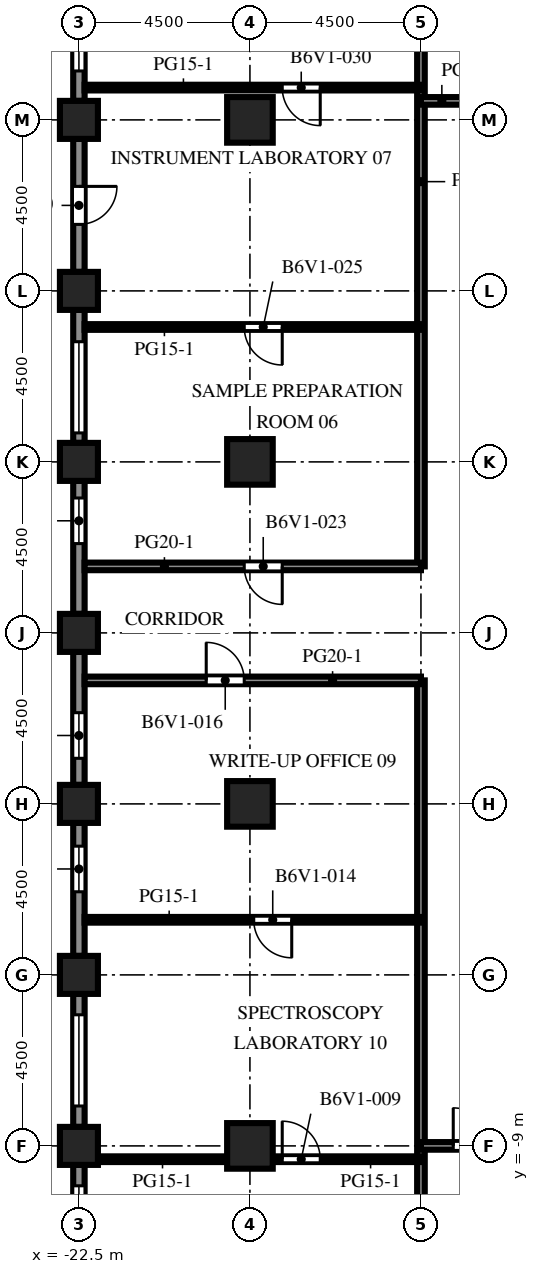
"""IFC4 building model, lengths in metres.
Left out: names, types, materials, properties, quantities, classifications, styles, units other than length and angle.
Written with IfcOpenShell. Run it as: python <this file> out.ifc"""

import sys

from ifc_helpers import new_model, si_unit, direction, frame, frame_2d, origin, origin_2d, place, context, subcontext, project, spatial, rectangle, extrude, element, fill, save


model = new_model("IFC4")
c1 = context("Model", 3, precision=1e-05, world=origin(), true_north=direction((0.0, 1.0)))
c2 = subcontext(c1, "Body", "Model", "MODEL_VIEW")
j1 = project(units=[si_unit("LENGTHUNIT", "METRE"), si_unit("PLANEANGLEUNIT", "RADIAN")], contexts=[c1])
p1 = place(None, origin())
s1 = spatial("IfcSite", under=j1, at=p1, CompositionType="ELEMENT")
p2 = place(p1, origin())
s2 = spatial("IfcBuilding", under=s1, at=p2, CompositionType="ELEMENT")
p3 = place(p2, frame((0.0, 0.0, 203.8)))
s3 = spatial("IfcBuildingStorey", under=s2, at=p3, CompositionType="ELEMENT", Elevation=203.8)
for number, where, z_axis, x_axis in (
    (1, (-22.5, -9.0, 0.0), (0.0, 0.0, 1.0), (1.0, 0.0, 0.0)),
    (2, (-22.5, -4.5, 0.0), (0.0, 0.0, 1.0), (1.0, 0.0, 0.0)),
    (3, (-22.5, 0.0, 0.0), (0.0, 0.0, 1.0), (1.0, 0.0, 0.0)),
    (4, (-22.5, 4.5, 0.0), (0.0, 0.0, 1.0), (1.0, 0.0, 0.0)),
    (5, (-22.5, 9.0, 0.0), (0.0, 0.0, 1.0), (1.0, 0.0, 0.0)),
    (6, (-22.5, 13.5, 0.0), (0.0, 0.0, 1.0), (1.0, 0.0, 0.0)),
    (7, (-22.5, 18.0, 0.0), (0.0, 0.0, 1.0), (1.0, 0.0, 0.0)),
):
    element("IfcColumn", number, at=place(p3, frame(where, z_axis=z_axis, x_axis=x_axis)), inside=s3, PredefinedType="COLUMN", context=c2, shape_type="SweptSolid", body=[
        extrude(rectangle(XDim=1.0, YDim=1.0, at=origin_2d()), origin(), (0.0, 0.0, 1.0), 4.1),
    ])
for number, where, z_axis, x_axis in (
    (8, (-18.0, -9.0, 0.0), (0.0, 0.0, 1.0), (1.0, 0.0, 0.0)),
    (9, (-18.0, 0.0, 0.0), (0.0, 0.0, 1.0), (1.0, 0.0, 0.0)),
    (10, (-18.0, 9.0, 0.0), (0.0, 0.0, 1.0), (1.0, 0.0, 0.0)),
    (11, (-18.0, 18.0, 0.0), (0.0, 0.0, 1.0), (1.0, 0.0, 0.0)),
):
    element("IfcColumn", number, at=place(p3, frame(where, z_axis=z_axis, x_axis=x_axis)), inside=s3, PredefinedType="COLUMN", context=c2, shape_type="SweptSolid", body=[
        extrude(rectangle(XDim=1.2, YDim=1.2, at=origin_2d()), origin(), (0.0, 0.0, 1.0), 4.1),
    ])
p4 = place(p3, frame((-22.5, 18.5, 0.0), z_axis=(0.0, 0.0, 1.0), x_axis=(0.0, 1.0, 0.0)))
e12 = element("IfcWall", 12, at=p4, inside=s3, PredefinedType="SOLIDWALL", context=c2, shape_type="SweptSolid", body=[
    extrude(rectangle(XDim=3.5, YDim=0.3, at=frame_2d((1.75, 0.0))), origin(), (0.0, 0.0, 1.0), 2.85),
])
p5 = place(p4, frame((0.788, 0.0, 0.8)))
e13 = element("IfcOpeningElement", 13, at=p5, cuts=e12, PredefinedType="OPENING", context=c2, shape_type="SweptSolid", body=[
    extrude(rectangle(XDim=2.4, YDim=1.7, at=frame_2d((1.2, 0.85))), frame((0.0, 0.16, 0.0), z_axis=(0.0, -1.0, 0.0), x_axis=(1.0, 0.0, 0.0)), (0.0, 0.0, 1.0), 0.32),
])
p6 = place(p3, frame((-22.5, 14.0, 0.0), z_axis=(0.0, 0.0, 1.0), x_axis=(0.0, 1.0, 0.0)))
e14 = element("IfcWall", 14, at=p6, inside=s3, PredefinedType="SOLIDWALL", context=c2, shape_type="SweptSolid", body=[
    extrude(rectangle(XDim=3.5, YDim=0.3, at=frame_2d((1.75, 0.0))), origin(), (0.0, 0.0, 1.0), 2.85),
])
p7 = place(p6, frame((1.25, 0.0, 0.0)))
e15 = element("IfcOpeningElement", 15, at=p7, cuts=e14, PredefinedType="OPENING", context=c2, shape_type="SweptSolid", body=[
    extrude(rectangle(XDim=1.0, YDim=2.2, at=frame_2d((0.5, 1.1))), frame((0.0, 0.16, 0.0), z_axis=(0.0, -1.0, 0.0), x_axis=(1.0, 0.0, 0.0)), (0.0, 0.0, 1.0), 0.32),
])
p8 = place(p3, frame((-22.5, 9.5, 0.0), z_axis=(0.0, 0.0, 1.0), x_axis=(0.0, 1.0, 0.0)))
e16 = element("IfcWall", 16, at=p8, inside=s3, PredefinedType="SOLIDWALL", context=c2, shape_type="SweptSolid", body=[
    extrude(rectangle(XDim=3.5, YDim=0.3, at=frame_2d((1.75, 0.0))), origin(), (0.0, 0.0, 1.0), 2.85),
])
p9 = place(p8, frame((0.262, 0.0, 0.8)))
e17 = element("IfcOpeningElement", 17, at=p9, cuts=e16, PredefinedType="OPENING", context=c2, shape_type="SweptSolid", body=[
    extrude(rectangle(XDim=2.4, YDim=1.7, at=frame_2d((1.2, 0.85))), frame((0.0, 0.16, 0.0), z_axis=(0.0, -1.0, 0.0), x_axis=(1.0, 0.0, 0.0)), (0.0, 0.0, 1.0), 0.32),
])
p10 = place(p3, frame((-22.5, 5.0, 0.0), z_axis=(0.0, 0.0, 1.0), x_axis=(0.0, 1.0, 0.0)))
e18 = element("IfcWall", 18, at=p10, inside=s3, PredefinedType="SOLIDWALL", context=c2, shape_type="SweptSolid", body=[
    extrude(rectangle(XDim=3.5, YDim=0.3, at=frame_2d((1.75, 0.0))), origin(), (0.0, 0.0, 1.0), 2.85),
])
p11 = place(p10, frame((1.85, 0.0, 0.8)))
e19 = element("IfcOpeningElement", 19, at=p11, cuts=e18, PredefinedType="OPENING", context=c2, shape_type="SweptSolid", body=[
    extrude(rectangle(XDim=1.2, YDim=1.7, at=frame_2d((0.6, 0.85))), frame((0.0, 0.16, 0.0), z_axis=(0.0, -1.0, 0.0), x_axis=(1.0, 0.0, 0.0)), (0.0, 0.0, 1.0), 0.32),
])
p12 = place(p3, frame((-22.5, 0.5, 0.0), z_axis=(0.0, 0.0, 1.0), x_axis=(0.0, 1.0, 0.0)))
e20 = element("IfcWall", 20, at=p12, inside=s3, PredefinedType="SOLIDWALL", context=c2, shape_type="SweptSolid", body=[
    extrude(rectangle(XDim=3.5, YDim=0.3, at=frame_2d((1.75, 0.0))), origin(), (0.0, 0.0, 1.0), 2.85),
])
p13 = place(p12, frame((0.7, 0.0, 0.8)))
e21 = element("IfcOpeningElement", 21, at=p13, cuts=e20, PredefinedType="OPENING", context=c2, shape_type="SweptSolid", body=[
    extrude(rectangle(XDim=1.2, YDim=1.7, at=frame_2d((0.6, 0.85))), frame((0.0, 0.16, 0.0), z_axis=(0.0, -1.0, 0.0), x_axis=(1.0, 0.0, 0.0)), (0.0, 0.0, 1.0), 0.32),
])
p14 = place(p3, frame((-22.5, -4.0, 0.0), z_axis=(0.0, 0.0, 1.0), x_axis=(0.0, 1.0, 0.0)))
e22 = element("IfcWall", 22, at=p14, inside=s3, PredefinedType="SOLIDWALL", context=c2, shape_type="SweptSolid", body=[
    extrude(rectangle(XDim=3.5, YDim=0.3, at=frame_2d((1.75, 0.0))), origin(), (0.0, 0.0, 1.0), 2.85),
])
p15 = place(p14, frame((1.688, 0.0, 0.8)))
e23 = element("IfcOpeningElement", 23, at=p15, cuts=e22, PredefinedType="OPENING", context=c2, shape_type="SweptSolid", body=[
    extrude(rectangle(XDim=1.2, YDim=1.7, at=frame_2d((0.6, 0.85))), frame((0.0, 0.16, 0.0), z_axis=(0.0, -1.0, 0.0), x_axis=(1.0, 0.0, 0.0)), (0.0, 0.0, 1.0), 0.32),
])
p16 = place(p3, frame((-22.5, -8.5, 0.0), z_axis=(0.0, 0.0, 1.0), x_axis=(0.0, 1.0, 0.0)))
e24 = element("IfcWall", 24, at=p16, inside=s3, PredefinedType="SOLIDWALL", context=c2, shape_type="SweptSolid", body=[
    extrude(rectangle(XDim=3.5, YDim=0.3, at=frame_2d((1.75, 0.0))), origin(), (0.0, 0.0, 1.0), 2.85),
])
p17 = place(p16, frame((0.55, 0.0, 0.8)))
e25 = element("IfcOpeningElement", 25, at=p17, cuts=e24, PredefinedType="OPENING", context=c2, shape_type="SweptSolid", body=[
    extrude(rectangle(XDim=2.4, YDim=1.7, at=frame_2d((1.2, 0.85))), frame((0.0, 0.16, 0.0), z_axis=(0.0, -1.0, 0.0), x_axis=(1.0, 0.0, 0.0)), (0.0, 0.0, 1.0), 0.32),
])
p18 = place(p3, frame((-22.5, -13.0, 0.0), z_axis=(0.0, 0.0, 1.0), x_axis=(0.0, 1.0, 0.0)))
e26 = element("IfcWall", 26, at=p18, inside=s3, PredefinedType="SOLIDWALL", context=c2, shape_type="SweptSolid", body=[
    extrude(rectangle(XDim=3.5, YDim=0.3, at=frame_2d((1.75, 0.0))), origin(), (0.0, 0.0, 1.0), 2.85),
])
p19 = place(p18, frame((0.55, 0.0, 0.8)))
e27 = element("IfcOpeningElement", 27, at=p19, cuts=e26, PredefinedType="OPENING", context=c2, shape_type="SweptSolid", body=[
    extrude(rectangle(XDim=2.4, YDim=1.7, at=frame_2d((1.2, 0.85))), frame((0.0, 0.16, 0.0), z_axis=(0.0, -1.0, 0.0), x_axis=(1.0, 0.0, 0.0)), (0.0, 0.0, 1.0), 0.32),
])
p20 = place(p3, frame((-13.5, -26.5, 0.0), z_axis=(0.0, 0.0, 1.0), x_axis=(0.0, 1.0, 0.0)))
e28 = element("IfcWall", 28, at=p20, inside=s3, PredefinedType="PARTITIONING", context=c2, shape_type="SweptSolid", body=[
    extrude(rectangle(XDim=29.75, YDim=0.2, at=frame_2d((14.875, 0.0))), origin(), (0.0, 0.0, 1.0), 3.65),
])
p21 = place(p3, frame((-13.5, 6.25, 0.0), z_axis=(0.0, 0.0, 1.0), x_axis=(0.0, 1.0, 0.0)))
e29 = element("IfcWall", 29, at=p21, inside=s3, PredefinedType="PARTITIONING", context=c2, shape_type="SweptSolid", body=[
    extrude(rectangle(XDim=20.25, YDim=0.2, at=frame_2d((10.125, 0.0))), origin(), (0.0, 0.0, 1.0), 3.65),
])
p22 = place(p3, frame((-22.0, -9.35, 0.0), z_axis=(0.0, 0.0, 1.0), x_axis=(1.0, 0.0, 0.0)))
e30 = element("IfcWall", 30, at=p22, inside=s3, PredefinedType="PARTITIONING", context=c2, shape_type="SweptSolid", body=[
    extrude(rectangle(XDim=3.4, YDim=0.15, at=frame_2d((1.7, 0.0))), origin(), (0.0, 0.0, 1.0), 3.65),
])
p23 = place(p3, frame((-13.5, -9.35, 0.0), z_axis=(0.0, 0.0, 1.0), x_axis=(-1.0, 0.0, 0.0)))
e31 = element("IfcWall", 31, at=p23, inside=s3, PredefinedType="PARTITIONING", context=c2, shape_type="SweptSolid", body=[
    extrude(rectangle(XDim=3.9, YDim=0.15, at=frame_2d((1.95, 0.0))), origin(), (0.0, 0.0, 1.0), 3.65),
])
p24 = place(p23, frame((2.65, 0.0, 0.0)))
e32 = element("IfcOpeningElement", 32, at=p24, cuts=e31, PredefinedType="OPENING", context=c2, shape_type="SweptSolid", body=[
    extrude(rectangle(XDim=1.0, YDim=2.1, at=frame_2d((0.5, 1.05))), frame((0.0, 0.085, 0.0), z_axis=(0.0, -1.0, 0.0), x_axis=(1.0, 0.0, 0.0)), (0.0, 0.0, 1.0), 0.17),
])
p25 = place(p3, frame((-10.5, -9.0, 0.0), z_axis=(0.0, 0.0, 1.0), x_axis=(-1.0, 0.0, 0.0)))
e33 = element("IfcWall", 33, at=p25, inside=s3, PredefinedType="PARTITIONING", context=c2, shape_type="SweptSolid", body=[
    extrude(rectangle(XDim=3.0, YDim=0.2, at=frame_2d((1.5, 0.0))), origin(), (0.0, 0.0, 1.0), 3.65),
])
p26 = place(p25, frame((1.15, 0.0, 0.0)))
e34 = element("IfcOpeningElement", 34, at=p26, cuts=e33, PredefinedType="OPENING", context=c2, shape_type="SweptSolid", body=[
    extrude(rectangle(XDim=1.0, YDim=2.1, at=frame_2d((0.5, 1.05))), frame((0.0, 0.11, 0.0), z_axis=(0.0, -1.0, 0.0), x_axis=(1.0, 0.0, 0.0)), (0.0, 0.0, 1.0), 0.22),
])
p27 = place(p3, frame((-13.5, -3.05, 0.0), z_axis=(0.0, 0.0, 1.0), x_axis=(-1.0, 0.0, 0.0)))
e35 = element("IfcWall", 35, at=p27, inside=s3, PredefinedType="PARTITIONING", context=c2, shape_type="SweptSolid", body=[
    extrude(rectangle(XDim=8.85, YDim=0.15, at=frame_2d((4.425, 0.0))), origin(), (0.0, 0.0, 1.0), 3.65),
])
p28 = place(p27, frame((3.4, 0.0, 0.0)))
e36 = element("IfcOpeningElement", 36, at=p28, cuts=e35, PredefinedType="OPENING", context=c2, shape_type="SweptSolid", body=[
    extrude(rectangle(XDim=1.0, YDim=2.1, at=frame_2d((0.5, 1.05))), frame((0.0, 0.085, 0.0), z_axis=(0.0, -1.0, 0.0), x_axis=(1.0, 0.0, 0.0)), (0.0, 0.0, 1.0), 0.17),
])
p29 = place(p3, frame((-13.5, 3.25, 0.0), z_axis=(0.0, 0.0, 1.0), x_axis=(-1.0, 0.0, 0.0)))
e37 = element("IfcWall", 37, at=p29, inside=s3, PredefinedType="PARTITIONING", context=c2, shape_type="SweptSolid", body=[
    extrude(rectangle(XDim=8.85, YDim=0.2, at=frame_2d((4.425, 0.0))), origin(), (0.0, 0.0, 1.0), 3.65),
])
p30 = place(p29, frame((4.65, 0.0, 0.0)))
e38 = element("IfcOpeningElement", 38, at=p30, cuts=e37, PredefinedType="OPENING", context=c2, shape_type="SweptSolid", body=[
    extrude(rectangle(XDim=1.0, YDim=2.1, at=frame_2d((0.5, 1.05))), frame((0.0, 0.11, 0.0), z_axis=(0.0, -1.0, 0.0), x_axis=(1.0, 0.0, 0.0)), (0.0, 0.0, 1.0), 0.22),
])
p31 = place(p3, frame((-22.35, 6.25, 0.0), z_axis=(0.0, 0.0, 1.0), x_axis=(1.0, 0.0, 0.0)))
e39 = element("IfcWall", 39, at=p31, inside=s3, PredefinedType="PARTITIONING", context=c2, shape_type="SweptSolid", body=[
    extrude(rectangle(XDim=8.85, YDim=0.2, at=frame_2d((4.425, 0.0))), origin(), (0.0, 0.0, 1.0), 3.65),
])
p32 = place(p31, frame((4.2, 0.0, 0.0)))
e40 = element("IfcOpeningElement", 40, at=p32, cuts=e39, PredefinedType="OPENING", context=c2, shape_type="SweptSolid", body=[
    extrude(rectangle(XDim=1.0, YDim=2.1, at=frame_2d((0.5, 1.05))), frame((0.0, 0.11, 0.0), z_axis=(0.0, -1.0, 0.0), x_axis=(1.0, 0.0, 0.0)), (0.0, 0.0, 1.0), 0.22),
])
p33 = place(p3, frame((-22.35, 12.55, 0.0), z_axis=(0.0, 0.0, 1.0), x_axis=(1.0, 0.0, 0.0)))
e41 = element("IfcWall", 41, at=p33, inside=s3, PredefinedType="PARTITIONING", context=c2, shape_type="SweptSolid", body=[
    extrude(rectangle(XDim=8.85, YDim=0.15, at=frame_2d((4.425, 0.0))), origin(), (0.0, 0.0, 1.0), 3.65),
])
p34 = place(p33, frame((4.2, 0.0, 0.0)))
e42 = element("IfcOpeningElement", 42, at=p34, cuts=e41, PredefinedType="OPENING", context=c2, shape_type="SweptSolid", body=[
    extrude(rectangle(XDim=1.0, YDim=2.1, at=frame_2d((0.5, 1.05))), frame((0.0, 0.085, 0.0), z_axis=(0.0, -1.0, 0.0), x_axis=(1.0, 0.0, 0.0)), (0.0, 0.0, 1.0), 0.17),
])
p35 = place(p3, frame((-13.5, 18.5, 0.0), z_axis=(0.0, 0.0, 1.0), x_axis=(1.0, 0.0, 0.0)))
e43 = element("IfcWall", 43, at=p35, inside=s3, PredefinedType="PARTITIONING", context=c2, shape_type="SweptSolid", body=[
    extrude(rectangle(XDim=3.0, YDim=0.2, at=frame_2d((1.5, 0.0))), origin(), (0.0, 0.0, 1.0), 3.65),
])
p36 = place(p35, frame((1.1, 0.0, 0.0)))
e44 = element("IfcOpeningElement", 44, at=p36, cuts=e43, PredefinedType="OPENING", context=c2, shape_type="SweptSolid", body=[
    extrude(rectangle(XDim=1.0, YDim=2.1, at=frame_2d((0.5, 1.05))), frame((0.0, 0.11, 0.0), z_axis=(0.0, -1.0, 0.0), x_axis=(1.0, 0.0, 0.0)), (0.0, 0.0, 1.0), 0.22),
])
p37 = place(p3, frame((-22.35, 18.85, 0.0), z_axis=(0.0, 0.0, 1.0), x_axis=(1.0, 0.0, 0.0)))
e45 = element("IfcWall", 45, at=p37, inside=s3, PredefinedType="PARTITIONING", context=c2, shape_type="SweptSolid", body=[
    extrude(rectangle(XDim=8.85, YDim=0.15, at=frame_2d((4.425, 0.0))), origin(), (0.0, 0.0, 1.0), 3.65),
])
p38 = place(p37, frame((5.2, 0.0, 0.0)))
e46 = element("IfcOpeningElement", 46, at=p38, cuts=e45, PredefinedType="OPENING", context=c2, shape_type="SweptSolid", body=[
    extrude(rectangle(XDim=1.0, YDim=2.1, at=frame_2d((0.5, 1.05))), frame((0.0, 0.085, 0.0), z_axis=(0.0, -1.0, 0.0), x_axis=(1.0, 0.0, 0.0)), (0.0, 0.0, 1.0), 0.17),
])
p39 = place(p5, origin())
e47 = element("IfcWindow", 47, at=p39, inside=s3, PartitioningType="SINGLE_PANEL", PredefinedType="WINDOW", context=c2, shape_type="SweptSolid", body=[
    extrude(rectangle(XDim=2.4, YDim=1.7, at=frame_2d((1.2, 0.85))), frame((0.0, 0.03, 0.0), z_axis=(0.0, -1.0, 0.0), x_axis=(1.0, 0.0, 0.0)), (0.0, 0.0, 1.0), 0.06),
])
fill(e13, e47)
p40 = place(p7, origin())
e48 = element("IfcDoor", 48, at=p40, inside=s3, OperationType="SINGLE_SWING_RIGHT", PredefinedType="DOOR", context=c2, shape_type="SweptSolid", body=[
    extrude(rectangle(XDim=1.0, YDim=2.2, at=frame_2d((0.5, 1.1))), frame((0.0, 0.025, 0.0), z_axis=(0.0, -1.0, 0.0), x_axis=(1.0, 0.0, 0.0)), (0.0, 0.0, 1.0), 0.05),
])
fill(e15, e48)
p41 = place(p9, origin())
e49 = element("IfcWindow", 49, at=p41, inside=s3, PartitioningType="SINGLE_PANEL", PredefinedType="WINDOW", context=c2, shape_type="SweptSolid", body=[
    extrude(rectangle(XDim=2.4, YDim=1.7, at=frame_2d((1.2, 0.85))), frame((0.0, 0.03, 0.0), z_axis=(0.0, -1.0, 0.0), x_axis=(1.0, 0.0, 0.0)), (0.0, 0.0, 1.0), 0.06),
])
fill(e17, e49)
p42 = place(p11, origin())
e50 = element("IfcWindow", 50, at=p42, inside=s3, PartitioningType="SINGLE_PANEL", PredefinedType="WINDOW", context=c2, shape_type="SweptSolid", body=[
    extrude(rectangle(XDim=1.2, YDim=1.7, at=frame_2d((0.6, 0.85))), frame((0.0, 0.03, 0.0), z_axis=(0.0, -1.0, 0.0), x_axis=(1.0, 0.0, 0.0)), (0.0, 0.0, 1.0), 0.06),
])
fill(e19, e50)
p43 = place(p13, origin())
e51 = element("IfcWindow", 51, at=p43, inside=s3, PartitioningType="SINGLE_PANEL", PredefinedType="WINDOW", context=c2, shape_type="SweptSolid", body=[
    extrude(rectangle(XDim=1.2, YDim=1.7, at=frame_2d((0.6, 0.85))), frame((0.0, 0.03, 0.0), z_axis=(0.0, -1.0, 0.0), x_axis=(1.0, 0.0, 0.0)), (0.0, 0.0, 1.0), 0.06),
])
fill(e21, e51)
p44 = place(p15, origin())
e52 = element("IfcWindow", 52, at=p44, inside=s3, PartitioningType="SINGLE_PANEL", PredefinedType="WINDOW", context=c2, shape_type="SweptSolid", body=[
    extrude(rectangle(XDim=1.2, YDim=1.7, at=frame_2d((0.6, 0.85))), frame((0.0, 0.03, 0.0), z_axis=(0.0, -1.0, 0.0), x_axis=(1.0, 0.0, 0.0)), (0.0, 0.0, 1.0), 0.06),
])
fill(e23, e52)
p45 = place(p17, origin())
e53 = element("IfcWindow", 53, at=p45, inside=s3, PartitioningType="SINGLE_PANEL", PredefinedType="WINDOW", context=c2, shape_type="SweptSolid", body=[
    extrude(rectangle(XDim=2.4, YDim=1.7, at=frame_2d((1.2, 0.85))), frame((0.0, 0.03, 0.0), z_axis=(0.0, -1.0, 0.0), x_axis=(1.0, 0.0, 0.0)), (0.0, 0.0, 1.0), 0.06),
])
fill(e25, e53)
p46 = place(p19, origin())
e54 = element("IfcWindow", 54, at=p46, inside=s3, PartitioningType="SINGLE_PANEL", PredefinedType="WINDOW", context=c2, shape_type="SweptSolid", body=[
    extrude(rectangle(XDim=2.4, YDim=1.7, at=frame_2d((1.2, 0.85))), frame((0.0, 0.03, 0.0), z_axis=(0.0, -1.0, 0.0), x_axis=(1.0, 0.0, 0.0)), (0.0, 0.0, 1.0), 0.06),
])
fill(e27, e54)
p47 = place(p24, origin())
e55 = element("IfcDoor", 55, at=p47, inside=s3, OperationType="SINGLE_SWING_RIGHT", PredefinedType="DOOR", context=c2, shape_type="SweptSolid", body=[
    extrude(rectangle(XDim=1.0, YDim=2.1, at=frame_2d((0.5, 1.05))), frame((0.0, 0.025, 0.0), z_axis=(0.0, -1.0, 0.0), x_axis=(1.0, 0.0, 0.0)), (0.0, 0.0, 1.0), 0.05),
])
fill(e32, e55)
p48 = place(p26, origin())
e56 = element("IfcDoor", 56, at=p48, inside=s3, OperationType="SINGLE_SWING_RIGHT", PredefinedType="DOOR", context=c2, shape_type="SweptSolid", body=[
    extrude(rectangle(XDim=1.0, YDim=2.1, at=frame_2d((0.5, 1.05))), frame((0.0, 0.025, 0.0), z_axis=(0.0, -1.0, 0.0), x_axis=(1.0, 0.0, 0.0)), (0.0, 0.0, 1.0), 0.05),
])
fill(e34, e56)
p49 = place(p28, origin())
e57 = element("IfcDoor", 57, at=p49, inside=s3, OperationType="SINGLE_SWING_LEFT", PredefinedType="DOOR", context=c2, shape_type="SweptSolid", body=[
    extrude(rectangle(XDim=1.0, YDim=2.1, at=frame_2d((0.5, 1.05))), frame((0.0, 0.025, 0.0), z_axis=(0.0, -1.0, 0.0), x_axis=(1.0, 0.0, 0.0)), (0.0, 0.0, 1.0), 0.05),
])
fill(e36, e57)
p50 = place(p30, origin())
e58 = element("IfcDoor", 58, at=p50, inside=s3, OperationType="SINGLE_SWING_RIGHT", PredefinedType="DOOR", context=c2, shape_type="SweptSolid", body=[
    extrude(rectangle(XDim=1.0, YDim=2.1, at=frame_2d((0.5, 1.05))), frame((0.0, 0.025, 0.0), z_axis=(0.0, -1.0, 0.0), x_axis=(1.0, 0.0, 0.0)), (0.0, 0.0, 1.0), 0.05),
])
fill(e38, e58)
p51 = place(p32, origin())
e59 = element("IfcDoor", 59, at=p51, inside=s3, OperationType="SINGLE_SWING_RIGHT", PredefinedType="DOOR", context=c2, shape_type="SweptSolid", body=[
    extrude(rectangle(XDim=1.0, YDim=2.1, at=frame_2d((0.5, 1.05))), frame((0.0, 0.025, 0.0), z_axis=(0.0, -1.0, 0.0), x_axis=(1.0, 0.0, 0.0)), (0.0, 0.0, 1.0), 0.05),
])
fill(e40, e59)
p52 = place(p34, origin())
e60 = element("IfcDoor", 60, at=p52, inside=s3, OperationType="SINGLE_SWING_RIGHT", PredefinedType="DOOR", context=c2, shape_type="SweptSolid", body=[
    extrude(rectangle(XDim=1.0, YDim=2.1, at=frame_2d((0.5, 1.05))), frame((0.0, 0.025, 0.0), z_axis=(0.0, -1.0, 0.0), x_axis=(1.0, 0.0, 0.0)), (0.0, 0.0, 1.0), 0.05),
])
fill(e42, e60)
p53 = place(p38, origin())
e61 = element("IfcDoor", 61, at=p53, inside=s3, OperationType="SINGLE_SWING_RIGHT", PredefinedType="DOOR", context=c2, shape_type="SweptSolid", body=[
    extrude(rectangle(XDim=1.0, YDim=2.1, at=frame_2d((0.5, 1.05))), frame((0.0, 0.025, 0.0), z_axis=(0.0, -1.0, 0.0), x_axis=(1.0, 0.0, 0.0)), (0.0, 0.0, 1.0), 0.05),
])
fill(e46, e61)
save(model, sys.argv[1])
